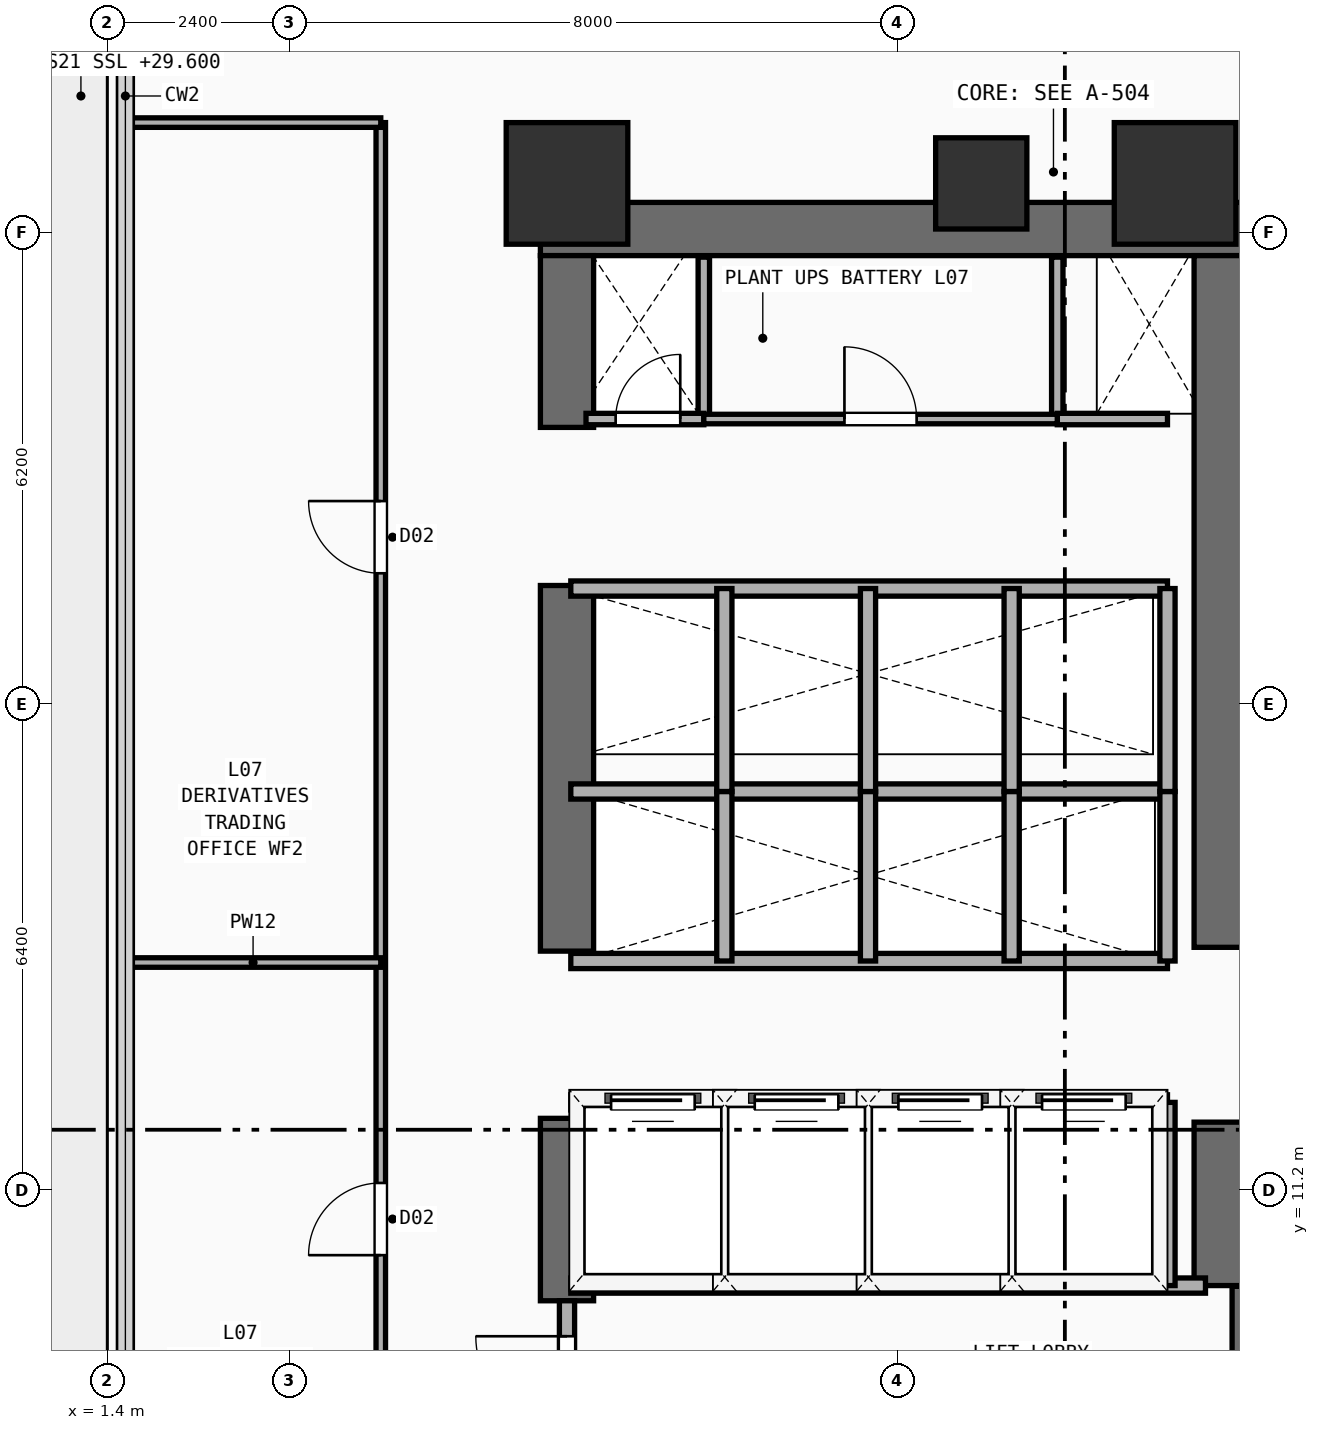
"""IFC4 building model, lengths in metres.
Left out: names, types, materials, properties, quantities, classifications, styles, units other than length and angle.
Written with IfcOpenShell. Run it as: python <this file> out.ifc"""

import sys

from ifc_helpers import new_model, si_unit, direction, frame, frame_2d, origin, origin_2d, place, context, subcontext, project, spatial, rectangle, extrude, element, fill, save


model = new_model("IFC4")
c1 = context("Model", 3, precision=1e-05, world=origin(), true_north=direction((0.0, 1.0)))
c2 = subcontext(c1, "Body", "Model", "MODEL_VIEW")
j1 = project(units=[si_unit("LENGTHUNIT", "METRE"), si_unit("PLANEANGLEUNIT", "RADIAN")], contexts=[c1])
p1 = place(None, origin())
s1 = spatial("IfcSite", under=j1, at=p1, CompositionType="ELEMENT")
p2 = place(p1, origin())
s2 = spatial("IfcBuilding", under=s1, at=p2, CompositionType="ELEMENT")
p3 = place(p2, frame((0.0, 0.0, 29.6)))
s3 = spatial("IfcBuildingStorey", under=s2, at=p3, CompositionType="ELEMENT", Elevation=29.6)
p4 = place(p3, frame((7.1, 23.85, 0.0), z_axis=(0.0, 0.0, 1.0), x_axis=(1.0, 0.0, 0.0)))
e1 = element("IfcWall", 1, at=p4, inside=s3, PredefinedType="SHEAR", context=c2, shape_type="SweptSolid", body=[
    extrude(rectangle(XDim=14.05, YDim=0.7, at=frame_2d((7.025, 0.0))), origin(), (0.0, 0.0, 1.0), 3.54),
])
p5 = place(p3, frame((7.45, 9.75, 0.0), z_axis=(0.0, 0.0, 1.0), x_axis=(0.0, 1.0, 0.0)))
e2 = element("IfcWall", 2, at=p5, inside=s3, PredefinedType="SHEAR", context=c2, shape_type="SweptSolid", body=[
    extrude(rectangle(XDim=2.4, YDim=0.7, at=frame_2d((1.2, 0.0))), origin(), (0.0, 0.0, 1.0), 3.54),
])
p6 = place(p3, frame((7.45, 14.35, 0.0), z_axis=(0.0, 0.0, 1.0), x_axis=(0.0, 1.0, 0.0)))
e3 = element("IfcWall", 3, at=p6, inside=s3, PredefinedType="SHEAR", context=c2, shape_type="SweptSolid", body=[
    extrude(rectangle(XDim=4.81, YDim=0.7, at=frame_2d((2.405, 0.0))), origin(), (0.0, 0.0, 1.0), 3.54),
])
p7 = place(p3, frame((7.45, 21.24, 0.0), z_axis=(0.0, 0.0, 1.0), x_axis=(0.0, 1.0, 0.0)))
e4 = element("IfcWall", 4, at=p7, inside=s3, PredefinedType="SHEAR", context=c2, shape_type="SweptSolid", body=[
    extrude(rectangle(XDim=2.26, YDim=0.7, at=frame_2d((1.13, 0.0))), origin(), (0.0, 0.0, 1.0), 3.54),
])
p8 = place(p3, frame((16.05, 9.95, 0.0), z_axis=(0.0, 0.0, 1.0), x_axis=(0.0, 1.0, 0.0)))
e5 = element("IfcWall", 5, at=p8, inside=s3, PredefinedType="SHEAR", context=c2, shape_type="SweptSolid", body=[
    extrude(rectangle(XDim=2.15, YDim=0.7, at=frame_2d((1.075, 0.0))), origin(), (0.0, 0.0, 1.0), 3.54),
])
p9 = place(p3, frame((16.05, 14.4, 0.0), z_axis=(0.0, 0.0, 1.0), x_axis=(0.0, 1.0, 0.0)))
e6 = element("IfcWall", 6, at=p9, inside=s3, PredefinedType="SHEAR", context=c2, shape_type="SweptSolid", body=[
    extrude(rectangle(XDim=9.1, YDim=0.7, at=frame_2d((4.55, 0.0))), origin(), (0.0, 0.0, 1.0), 3.54),
])
for number, where, z_axis, x_axis in (
    (7, (7.45, 24.45, 0.0), (0.0, 0.0, 1.0), (1.0, 0.0, 0.0)),
    (8, (15.45, 24.45, 0.0), (0.0, 0.0, 1.0), (1.0, 0.0, 0.0)),
):
    element("IfcColumn", number, at=place(p3, frame(where, z_axis=z_axis, x_axis=x_axis)), inside=s3, PredefinedType="COLUMN", context=c2, shape_type="SweptSolid", body=[
        extrude(rectangle(XDim=1.6, YDim=1.6, at=origin_2d()), origin(), (0.0, 0.0, 1.0), 3.54),
    ])
p10 = place(p3, frame((12.9, 24.45, -0.45), z_axis=(0.0, 0.0, 1.0), x_axis=(1.0, 0.0, 0.0)))
e9 = element("IfcColumn", 9, at=p10, inside=s3, PredefinedType="COLUMN", context=c2, shape_type="SweptSolid", body=[
    extrude(rectangle(XDim=1.2, YDim=1.2, at=origin_2d()), origin(), (0.0, 0.0, 1.0), 3.99),
])
p11 = place(p3, frame((16.3, 7.36, 0.0), z_axis=(0.0, 0.0, 1.0), x_axis=(0.0, 1.0, 0.0)))
e10 = element("IfcWall", 10, at=p11, inside=s3, PredefinedType="SHEAR", context=c2, shape_type="SweptSolid", body=[
    extrude(rectangle(XDim=2.58, YDim=0.2, at=frame_2d((1.29, 0.0))), origin(), (0.0, 0.0, 1.0), 3.54),
])
p12 = place(p3, frame((7.5, 9.95, 0.0), z_axis=(0.0, 0.0, 1.0), x_axis=(1.0, 0.0, 0.0)))
e11 = element("IfcWall", 11, at=p12, inside=s3, PredefinedType="PARTITIONING", context=c2, shape_type="SweptSolid", body=[
    extrude(rectangle(XDim=8.35, YDim=0.2, at=frame_2d((4.175, 0.0))), origin(), (0.0, 0.0, 1.0), 3.54),
])
p13 = place(p3, frame((7.45, 7.45, 0.0), z_axis=(0.0, 0.0, 1.0), x_axis=(0.0, 1.0, 0.0)))
e12 = element("IfcWall", 12, at=p13, inside=s3, PredefinedType="PARTITIONING", context=c2, shape_type="SweptSolid", body=[
    extrude(rectangle(XDim=2.3, YDim=0.2, at=frame_2d((1.15, 0.0))), origin(), (0.0, 0.0, 1.0), 2.52),
])
p14 = place(p13, frame((0.633, 0.0, 0.0)))
e13 = element("IfcOpeningElement", 13, at=p14, cuts=e12, PredefinedType="OPENING", context=c2, shape_type="SweptSolid", body=[
    extrude(rectangle(XDim=1.2, YDim=2.25, at=frame_2d((0.6, 1.125))), frame((0.0, 0.11, 0.0), z_axis=(0.0, -1.0, 0.0), x_axis=(1.0, 0.0, 0.0)), (0.0, 0.0, 1.0), 0.22),
])
p15 = place(p3, frame((7.5, 12.36, 0.0), z_axis=(0.0, 0.0, 1.0), x_axis=(1.0, 0.0, 0.0)))
e14 = element("IfcWall", 14, at=p15, inside=s3, PredefinedType="PARTITIONING", context=c2, shape_type="SweptSolid", body=[
    extrude(rectangle(XDim=7.85, YDim=0.2, at=frame_2d((3.925, 0.0))), origin(), (0.0, 0.0, 1.0), 3.54),
])
p16 = place(p15, frame((0.53, 0.0, 0.0)))
e15 = element("IfcOpeningElement", 15, at=p16, cuts=e14, PredefinedType="OPENING", context=c2, shape_type="SweptSolid", body=[
    extrude(rectangle(XDim=1.1, YDim=2.2, at=frame_2d((0.55, 1.1))), frame((0.0, 0.11, 0.0), z_axis=(0.0, -1.0, 0.0), x_axis=(1.0, 0.0, 0.0)), (0.0, 0.0, 1.0), 0.22),
])
p17 = place(p15, frame((2.42, 0.0, 0.0)))
e16 = element("IfcOpeningElement", 16, at=p17, cuts=e14, PredefinedType="OPENING", context=c2, shape_type="SweptSolid", body=[
    extrude(rectangle(XDim=1.1, YDim=2.2, at=frame_2d((0.55, 1.1))), frame((0.0, 0.11, 0.0), z_axis=(0.0, -1.0, 0.0), x_axis=(1.0, 0.0, 0.0)), (0.0, 0.0, 1.0), 0.22),
])
p18 = place(p15, frame((4.31, 0.0, 0.0)))
e17 = element("IfcOpeningElement", 17, at=p18, cuts=e14, PredefinedType="OPENING", context=c2, shape_type="SweptSolid", body=[
    extrude(rectangle(XDim=1.1, YDim=2.2, at=frame_2d((0.55, 1.1))), frame((0.0, 0.11, 0.0), z_axis=(0.0, -1.0, 0.0), x_axis=(1.0, 0.0, 0.0)), (0.0, 0.0, 1.0), 0.22),
])
p19 = place(p15, frame((6.2, 0.0, 0.0)))
e18 = element("IfcOpeningElement", 18, at=p19, cuts=e14, PredefinedType="OPENING", context=c2, shape_type="SweptSolid", body=[
    extrude(rectangle(XDim=1.1, YDim=2.2, at=frame_2d((0.55, 1.1))), frame((0.0, 0.11, 0.0), z_axis=(0.0, -1.0, 0.0), x_axis=(1.0, 0.0, 0.0)), (0.0, 0.0, 1.0), 0.22),
])
for number, where, z_axis, x_axis in (
    (19, (15.35, 9.95, 0.0), (0.0, 0.0, 1.0), (0.0, 1.0, 0.0)),
    (20, (9.52, 9.95, 0.0), (0.0, 0.0, 1.0), (0.0, 1.0, 0.0)),
    (21, (11.41, 9.95, 0.0), (0.0, 0.0, 1.0), (0.0, 1.0, 0.0)),
    (22, (13.3, 9.95, 0.0), (0.0, 0.0, 1.0), (0.0, 1.0, 0.0)),
):
    element("IfcWall", number, at=place(p3, frame(where, z_axis=z_axis, x_axis=x_axis)), inside=s3, PredefinedType="PARTITIONING", context=c2, shape_type="SweptSolid", body=[
        extrude(rectangle(XDim=2.41, YDim=0.2, at=frame_2d((1.205, 0.0))), origin(), (0.0, 0.0, 1.0), 3.54),
    ])
for number, where, z_axis, x_axis in (
    (23, (7.5, 14.22, 0.0), (0.0, 0.0, 1.0), (1.0, 0.0, 0.0)),
    (24, (7.5, 16.45, 0.0), (0.0, 0.0, 1.0), (1.0, 0.0, 0.0)),
):
    element("IfcWall", number, at=place(p3, frame(where, z_axis=z_axis, x_axis=x_axis)), inside=s3, PredefinedType="PARTITIONING", context=c2, shape_type="SweptSolid", body=[
        extrude(rectangle(XDim=7.85, YDim=0.2, at=frame_2d((3.925, 0.0))), origin(), (0.0, 0.0, 1.0), 3.54),
    ])
for number, where, z_axis, x_axis in (
    (25, (15.35, 14.22, 0.0), (0.0, 0.0, 1.0), (0.0, 1.0, 0.0)),
    (26, (9.52, 14.22, 0.0), (0.0, 0.0, 1.0), (0.0, 1.0, 0.0)),
    (27, (11.41, 14.22, 0.0), (0.0, 0.0, 1.0), (0.0, 1.0, 0.0)),
    (28, (13.3, 14.22, 0.0), (0.0, 0.0, 1.0), (0.0, 1.0, 0.0)),
):
    element("IfcWall", number, at=place(p3, frame(where, z_axis=z_axis, x_axis=x_axis)), inside=s3, PredefinedType="PARTITIONING", context=c2, shape_type="SweptSolid", body=[
        extrude(rectangle(XDim=2.23, YDim=0.2, at=frame_2d((1.115, 0.0))), origin(), (0.0, 0.0, 1.0), 3.54),
    ])
p20 = place(p3, frame((7.5, 19.12, 0.0), z_axis=(0.0, 0.0, 1.0), x_axis=(1.0, 0.0, 0.0)))
e29 = element("IfcWall", 29, at=p20, inside=s3, PredefinedType="PARTITIONING", context=c2, shape_type="SweptSolid", body=[
    extrude(rectangle(XDim=7.85, YDim=0.2, at=frame_2d((3.925, 0.0))), origin(), (0.0, 0.0, 1.0), 3.54),
])
for number, where, z_axis, x_axis in (
    (30, (15.35, 16.45, 0.0), (0.0, 0.0, 1.0), (0.0, 1.0, 0.0)),
    (31, (9.52, 16.45, 0.0), (0.0, 0.0, 1.0), (0.0, 1.0, 0.0)),
    (32, (11.41, 16.45, 0.0), (0.0, 0.0, 1.0), (0.0, 1.0, 0.0)),
    (33, (13.3, 16.45, 0.0), (0.0, 0.0, 1.0), (0.0, 1.0, 0.0)),
):
    element("IfcWall", number, at=place(p3, frame(where, z_axis=z_axis, x_axis=x_axis)), inside=s3, PredefinedType="PARTITIONING", context=c2, shape_type="SweptSolid", body=[
        extrude(rectangle(XDim=2.67, YDim=0.2, at=frame_2d((1.335, 0.0))), origin(), (0.0, 0.0, 1.0), 3.54),
    ])
for number, where, z_axis, x_axis in (
    (34, (9.25, 21.35, 0.0), (0.0, 0.0, 1.0), (0.0, 1.0, 0.0)),
    (35, (13.9, 21.35, 0.0), (0.0, 0.0, 1.0), (0.0, 1.0, 0.0)),
):
    element("IfcWall", number, at=place(p3, frame(where, z_axis=z_axis, x_axis=x_axis)), inside=s3, PredefinedType="PARTITIONING", context=c2, shape_type="SweptSolid", body=[
        extrude(rectangle(XDim=2.13, YDim=0.15, at=frame_2d((1.065, 0.0))), origin(), (0.0, 0.0, 1.0), 3.54),
    ])
p21 = place(p3, frame((7.7, 21.35, 0.0), z_axis=(0.0, 0.0, 1.0), x_axis=(1.0, 0.0, 0.0)))
e36 = element("IfcWall", 36, at=p21, inside=s3, PredefinedType="PARTITIONING", context=c2, shape_type="SweptSolid", body=[
    extrude(rectangle(XDim=1.55, YDim=0.15, at=frame_2d((0.775, 0.0))), origin(), (0.0, 0.0, 1.0), 3.54),
])
p22 = place(p21, frame((0.39, 0.0, 0.0)))
e37 = element("IfcOpeningElement", 37, at=p22, cuts=e36, PredefinedType="OPENING", context=c2, shape_type="SweptSolid", body=[
    extrude(rectangle(XDim=0.85, YDim=2.15, at=frame_2d((0.425, 1.075))), frame((0.0, 0.085, 0.0), z_axis=(0.0, -1.0, 0.0), x_axis=(1.0, 0.0, 0.0)), (0.0, 0.0, 1.0), 0.17),
])
p23 = place(p3, frame((13.9, 21.35, 0.0), z_axis=(0.0, 0.0, 1.0), x_axis=(1.0, 0.0, 0.0)))
e38 = element("IfcWall", 38, at=p23, inside=s3, PredefinedType="PARTITIONING", context=c2, shape_type="SweptSolid", body=[
    extrude(rectangle(XDim=1.45, YDim=0.15, at=frame_2d((0.725, 0.0))), origin(), (0.0, 0.0, 1.0), 3.54),
])
p24 = place(p3, frame((9.25, 21.35, 0.0), z_axis=(0.0, 0.0, 1.0), x_axis=(1.0, 0.0, 0.0)))
e39 = element("IfcWall", 39, at=p24, inside=s3, PredefinedType="PARTITIONING", context=c2, shape_type="SweptSolid", body=[
    extrude(rectangle(XDim=4.65, YDim=0.125, at=frame_2d((2.325, 0.0))), origin(), (0.0, 0.0, 1.0), 3.54),
])
p25 = place(p24, frame((1.85, 0.0, 0.0)))
e40 = element("IfcOpeningElement", 40, at=p25, cuts=e39, PredefinedType="OPENING", context=c2, shape_type="SweptSolid", body=[
    extrude(rectangle(XDim=0.95, YDim=2.15, at=frame_2d((0.475, 1.075))), frame((0.0, 0.073, 0.0), z_axis=(0.0, -1.0, 0.0), x_axis=(1.0, 0.0, 0.0)), (0.0, 0.0, 1.0), 0.145),
])
p26 = place(p3, frame((5.0, 7.5, 0.0), z_axis=(0.0, 0.0, 1.0), x_axis=(0.0, 1.0, 0.0)))
e41 = element("IfcWall", 41, at=p26, inside=s3, PredefinedType="PARTITIONING", context=c2, shape_type="SweptSolid", body=[
    extrude(rectangle(XDim=17.75, YDim=0.125, at=frame_2d((8.875, 0.0))), origin(), (0.0, 0.0, 1.0), 3.54),
])
p27 = place(p26, frame((2.85, 0.0, 0.0)))
e42 = element("IfcOpeningElement", 42, at=p27, cuts=e41, PredefinedType="OPENING", context=c2, shape_type="SweptSolid", body=[
    extrude(rectangle(XDim=0.95, YDim=2.15, at=frame_2d((0.475, 1.075))), frame((0.0, 0.073, 0.0), z_axis=(0.0, -1.0, 0.0), x_axis=(1.0, 0.0, 0.0)), (0.0, 0.0, 1.0), 0.145),
])
p28 = place(p26, frame((11.821, 0.0, 0.0)))
e43 = element("IfcOpeningElement", 43, at=p28, cuts=e41, PredefinedType="OPENING", context=c2, shape_type="SweptSolid", body=[
    extrude(rectangle(XDim=0.95, YDim=2.15, at=frame_2d((0.475, 1.075))), frame((0.0, 0.073, 0.0), z_axis=(0.0, -1.0, 0.0), x_axis=(1.0, 0.0, 0.0)), (0.0, 0.0, 1.0), 0.145),
])
for number, where, z_axis, x_axis in (
    (44, (1.64, 25.25, 0.0), (0.0, 0.0, 1.0), (1.0, 0.0, 0.0)),
    (45, (1.64, 14.2, 0.0), (0.0, 0.0, 1.0), (1.0, 0.0, 0.0)),
):
    element("IfcWall", number, at=place(p3, frame(where, z_axis=z_axis, x_axis=x_axis)), inside=s3, PredefinedType="PARTITIONING", context=c2, shape_type="SweptSolid", body=[
        extrude(rectangle(XDim=3.36, YDim=0.125, at=frame_2d((1.68, 0.0))), origin(), (0.0, 0.0, 1.0), 3.54),
    ])
p29 = place(p14, frame((1.2, 0.0, 0.0), z_axis=(0.0, 0.0, 1.0), x_axis=(-1.0, 0.0, 0.0)))
e46 = element("IfcDoor", 46, at=p29, inside=s3, OperationType="SINGLE_SWING_LEFT", PredefinedType="DOOR", context=c2, shape_type="SweptSolid", body=[
    extrude(rectangle(XDim=1.2, YDim=2.25, at=frame_2d((0.6, 1.125))), frame((0.0, 0.025, 0.0), z_axis=(0.0, -1.0, 0.0), x_axis=(1.0, 0.0, 0.0)), (0.0, 0.0, 1.0), 0.05),
])
fill(e13, e46)
p30 = place(p16, origin())
e47 = element("IfcDoor", 47, at=p30, inside=s3, OperationType="SLIDING_TO_LEFT", PredefinedType="DOOR", context=c2, shape_type="SweptSolid", body=[
    extrude(rectangle(XDim=1.1, YDim=2.2, at=frame_2d((0.55, 1.1))), frame((0.0, 0.025, 0.0), z_axis=(0.0, -1.0, 0.0), x_axis=(1.0, 0.0, 0.0)), (0.0, 0.0, 1.0), 0.05),
])
fill(e15, e47)
p31 = place(p17, origin())
e48 = element("IfcDoor", 48, at=p31, inside=s3, OperationType="SLIDING_TO_LEFT", PredefinedType="DOOR", context=c2, shape_type="SweptSolid", body=[
    extrude(rectangle(XDim=1.1, YDim=2.2, at=frame_2d((0.55, 1.1))), frame((0.0, 0.025, 0.0), z_axis=(0.0, -1.0, 0.0), x_axis=(1.0, 0.0, 0.0)), (0.0, 0.0, 1.0), 0.05),
])
fill(e16, e48)
p32 = place(p18, origin())
e49 = element("IfcDoor", 49, at=p32, inside=s3, OperationType="SLIDING_TO_LEFT", PredefinedType="DOOR", context=c2, shape_type="SweptSolid", body=[
    extrude(rectangle(XDim=1.1, YDim=2.2, at=frame_2d((0.55, 1.1))), frame((0.0, 0.025, 0.0), z_axis=(0.0, -1.0, 0.0), x_axis=(1.0, 0.0, 0.0)), (0.0, 0.0, 1.0), 0.05),
])
fill(e17, e49)
p33 = place(p19, origin())
e50 = element("IfcDoor", 50, at=p33, inside=s3, OperationType="SLIDING_TO_LEFT", PredefinedType="DOOR", context=c2, shape_type="SweptSolid", body=[
    extrude(rectangle(XDim=1.1, YDim=2.2, at=frame_2d((0.55, 1.1))), frame((0.0, 0.025, 0.0), z_axis=(0.0, -1.0, 0.0), x_axis=(1.0, 0.0, 0.0)), (0.0, 0.0, 1.0), 0.05),
])
fill(e18, e50)
p34 = place(p22, origin())
e51 = element("IfcDoor", 51, at=p34, inside=s3, OperationType="SINGLE_SWING_RIGHT", PredefinedType="DOOR", context=c2, shape_type="SweptSolid", body=[
    extrude(rectangle(XDim=0.85, YDim=2.15, at=frame_2d((0.425, 1.075))), frame((0.0, 0.025, 0.0), z_axis=(0.0, -1.0, 0.0), x_axis=(1.0, 0.0, 0.0)), (0.0, 0.0, 1.0), 0.05),
])
fill(e37, e51)
p35 = place(p25, origin())
e52 = element("IfcDoor", 52, at=p35, inside=s3, OperationType="SINGLE_SWING_LEFT", PredefinedType="DOOR", context=c2, shape_type="SweptSolid", body=[
    extrude(rectangle(XDim=0.95, YDim=2.15, at=frame_2d((0.475, 1.075))), frame((0.0, 0.025, 0.0), z_axis=(0.0, -1.0, 0.0), x_axis=(1.0, 0.0, 0.0)), (0.0, 0.0, 1.0), 0.05),
])
fill(e40, e52)
p36 = place(p27, origin())
e53 = element("IfcDoor", 53, at=p36, inside=s3, OperationType="SINGLE_SWING_LEFT", PredefinedType="DOOR", context=c2, shape_type="SweptSolid", body=[
    extrude(rectangle(XDim=0.95, YDim=2.15, at=frame_2d((0.475, 1.075))), frame((0.0, 0.025, 0.0), z_axis=(0.0, -1.0, 0.0), x_axis=(1.0, 0.0, 0.0)), (0.0, 0.0, 1.0), 0.05),
])
fill(e42, e53)
p37 = place(p28, origin())
e54 = element("IfcDoor", 54, at=p37, inside=s3, OperationType="SINGLE_SWING_RIGHT", PredefinedType="DOOR", context=c2, shape_type="SweptSolid", body=[
    extrude(rectangle(XDim=0.95, YDim=2.15, at=frame_2d((0.475, 1.075))), frame((0.0, 0.025, 0.0), z_axis=(0.0, -1.0, 0.0), x_axis=(1.0, 0.0, 0.0)), (0.0, 0.0, 1.0), 0.05),
])
fill(e43, e54)
save(model, sys.argv[1])
